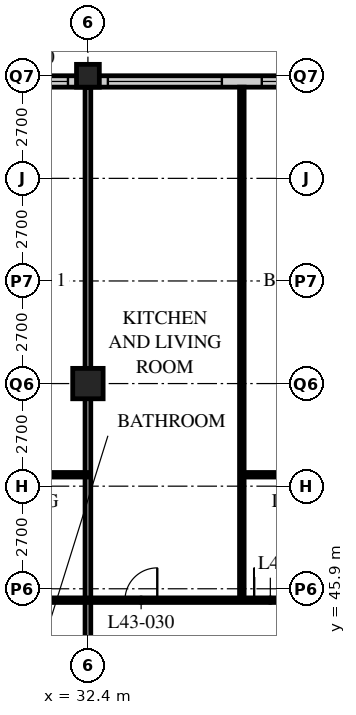
"""IFC4 building model, lengths in metres.
Left out: names, types, materials, properties, quantities, classifications, styles, units other than length and angle.
Written with IfcOpenShell. Run it as: python <this file> out.ifc"""

import sys

from ifc_helpers import new_model, si_unit, direction, frame, frame_2d, origin, origin_2d, place, context, subcontext, project, spatial, rectangle, hollow_rectangle, extrude, element, fill, save


model = new_model("IFC4")
c1 = context("Model", 3, precision=1e-05, world=origin(), true_north=direction((0.0, 1.0)))
c2 = subcontext(c1, "Body", "Model", "MODEL_VIEW")
j1 = project(units=[si_unit("LENGTHUNIT", "METRE"), si_unit("PLANEANGLEUNIT", "RADIAN")], contexts=[c1])
p1 = place(None, origin())
s1 = spatial("IfcSite", under=j1, at=p1, CompositionType="ELEMENT")
p2 = place(p1, origin())
s2 = spatial("IfcBuilding", under=s1, at=p2, CompositionType="ELEMENT")
p3 = place(p2, frame((0.0, 0.0, 170.4)))
s3 = spatial("IfcBuildingStorey", under=s2, at=p3, CompositionType="ELEMENT", Elevation=170.4)
p4 = place(p3, frame((32.4, 51.3, 0.0), z_axis=(0.0, 0.0, 1.0), x_axis=(1.0, 0.0, 0.0)))
e1 = element("IfcColumn", 1, at=p4, inside=s3, PredefinedType="COLUMN", context=c2, shape_type="SweptSolid", body=[
    extrude(hollow_rectangle(XDim=0.8, YDim=0.8, WallThickness=0.08, at=origin_2d()), origin(), (0.0, 0.0, 1.0), 3.6),
])
p5 = place(p3, frame((32.4, 59.4, 0.0), z_axis=(0.0, 0.0, 1.0), x_axis=(1.0, 0.0, 0.0)))
e2 = element("IfcColumn", 2, at=p5, inside=s3, PredefinedType="COLUMN", context=c2, shape_type="SweptSolid", body=[
    extrude(hollow_rectangle(XDim=0.6, YDim=0.6, WallThickness=0.05, at=origin_2d()), origin(), (0.0, 0.0, 1.0), 3.6),
])
p6 = place(p3, frame((48.3, 59.25, 0.0), z_axis=(0.0, 0.0, 1.0), x_axis=(-1.0, 0.0, 0.0)))
e3 = element("IfcWall", 3, at=p6, inside=s3, PredefinedType="SOLIDWALL", context=c2, shape_type="SweptSolid", body=[
    extrude(rectangle(XDim=40.2, YDim=0.3, at=frame_2d((20.1, 0.0))), origin(), (0.0, 0.0, 1.0), 3.39),
])
p7 = place(p6, frame((0.225, 0.0, 0.6)))
e4 = element("IfcOpeningElement", 4, at=p7, cuts=e3, PredefinedType="OPENING", context=c2, shape_type="SweptSolid", body=[
    extrude(rectangle(XDim=3.0, YDim=2.4, at=frame_2d((1.5, 1.2))), frame((0.0, 0.16, 0.0), z_axis=(0.0, -1.0, 0.0), x_axis=(1.0, 0.0, 0.0)), (0.0, 0.0, 1.0), 0.32),
])
p8 = place(p6, frame((4.275, 0.0, 0.6)))
e5 = element("IfcOpeningElement", 5, at=p8, cuts=e3, PredefinedType="OPENING", context=c2, shape_type="SweptSolid", body=[
    extrude(rectangle(XDim=3.0, YDim=2.4, at=frame_2d((1.5, 1.2))), frame((0.0, 0.16, 0.0), z_axis=(0.0, -1.0, 0.0), x_axis=(1.0, 0.0, 0.0)), (0.0, 0.0, 1.0), 0.32),
])
p9 = place(p6, frame((8.325, 0.0, 0.6)))
e6 = element("IfcOpeningElement", 6, at=p9, cuts=e3, PredefinedType="OPENING", context=c2, shape_type="SweptSolid", body=[
    extrude(rectangle(XDim=3.0, YDim=2.4, at=frame_2d((1.5, 1.2))), frame((0.0, 0.16, 0.0), z_axis=(0.0, -1.0, 0.0), x_axis=(1.0, 0.0, 0.0)), (0.0, 0.0, 1.0), 0.32),
])
p10 = place(p6, frame((12.375, 0.0, 0.6)))
e7 = element("IfcOpeningElement", 7, at=p10, cuts=e3, PredefinedType="OPENING", context=c2, shape_type="SweptSolid", body=[
    extrude(rectangle(XDim=3.0, YDim=2.4, at=frame_2d((1.5, 1.2))), frame((0.0, 0.16, 0.0), z_axis=(0.0, -1.0, 0.0), x_axis=(1.0, 0.0, 0.0)), (0.0, 0.0, 1.0), 0.32),
])
p11 = place(p6, frame((16.425, 0.0, 0.6)))
e8 = element("IfcOpeningElement", 8, at=p11, cuts=e3, PredefinedType="OPENING", context=c2, shape_type="SweptSolid", body=[
    extrude(rectangle(XDim=3.0, YDim=2.4, at=frame_2d((1.5, 1.2))), frame((0.0, 0.16, 0.0), z_axis=(0.0, -1.0, 0.0), x_axis=(1.0, 0.0, 0.0)), (0.0, 0.0, 1.0), 0.32),
])
p12 = place(p6, frame((20.475, 0.0, 0.6)))
e9 = element("IfcOpeningElement", 9, at=p12, cuts=e3, PredefinedType="OPENING", context=c2, shape_type="SweptSolid", body=[
    extrude(rectangle(XDim=3.0, YDim=2.4, at=frame_2d((1.5, 1.2))), frame((0.0, 0.16, 0.0), z_axis=(0.0, -1.0, 0.0), x_axis=(1.0, 0.0, 0.0)), (0.0, 0.0, 1.0), 0.32),
])
p13 = place(p6, frame((24.525, 0.0, 0.6)))
e10 = element("IfcOpeningElement", 10, at=p13, cuts=e3, PredefinedType="OPENING", context=c2, shape_type="SweptSolid", body=[
    extrude(rectangle(XDim=3.0, YDim=2.4, at=frame_2d((1.5, 1.2))), frame((0.0, 0.16, 0.0), z_axis=(0.0, -1.0, 0.0), x_axis=(1.0, 0.0, 0.0)), (0.0, 0.0, 1.0), 0.32),
])
p14 = place(p6, frame((28.575, 0.0, 0.6)))
e11 = element("IfcOpeningElement", 11, at=p14, cuts=e3, PredefinedType="OPENING", context=c2, shape_type="SweptSolid", body=[
    extrude(rectangle(XDim=3.0, YDim=2.4, at=frame_2d((1.5, 1.2))), frame((0.0, 0.16, 0.0), z_axis=(0.0, -1.0, 0.0), x_axis=(1.0, 0.0, 0.0)), (0.0, 0.0, 1.0), 0.32),
])
p15 = place(p6, frame((32.625, 0.0, 0.6)))
e12 = element("IfcOpeningElement", 12, at=p15, cuts=e3, PredefinedType="OPENING", context=c2, shape_type="SweptSolid", body=[
    extrude(rectangle(XDim=3.0, YDim=2.4, at=frame_2d((1.5, 1.2))), frame((0.0, 0.16, 0.0), z_axis=(0.0, -1.0, 0.0), x_axis=(1.0, 0.0, 0.0)), (0.0, 0.0, 1.0), 0.32),
])
p16 = place(p6, frame((36.675, 0.0, 0.6)))
e13 = element("IfcOpeningElement", 13, at=p16, cuts=e3, PredefinedType="OPENING", context=c2, shape_type="SweptSolid", body=[
    extrude(rectangle(XDim=3.0, YDim=2.4, at=frame_2d((1.5, 1.2))), frame((0.0, 0.16, 0.0), z_axis=(0.0, -1.0, 0.0), x_axis=(1.0, 0.0, 0.0)), (0.0, 0.0, 1.0), 0.32),
])
p17 = place(p3, frame((32.4, 43.2, 0.0), z_axis=(0.0, 0.0, 1.0), x_axis=(0.0, 1.0, 0.0)))
e14 = element("IfcWall", 14, at=p17, inside=s3, PredefinedType="PARTITIONING", context=c2, shape_type="SweptSolid", body=[
    extrude(rectangle(XDim=15.9, YDim=0.15, at=frame_2d((7.95, 0.0))), origin(), (0.0, 0.0, 1.0), 2.778),
])
p18 = place(p3, frame((36.45, 45.6, 0.0), z_axis=(0.0, 0.0, 1.0), x_axis=(0.0, 1.0, 0.0)))
e15 = element("IfcWall", 15, at=p18, inside=s3, PredefinedType="PARTITIONING", context=c2, shape_type="SweptSolid", body=[
    extrude(rectangle(XDim=13.5, YDim=0.12, at=frame_2d((6.75, 0.0))), origin(), (0.0, 0.0, 1.0), 3.39),
])
p19 = place(p3, frame((8.15, 45.6, 0.0), z_axis=(0.0, 0.0, 1.0), x_axis=(1.0, 0.0, 0.0)))
e16 = element("IfcWall", 16, at=p19, inside=s3, PredefinedType="PARTITIONING", context=c2, shape_type="SweptSolid", body=[
    extrude(rectangle(XDim=40.4, YDim=0.12, at=frame_2d((20.2, 0.0))), origin(), (0.0, 0.0, 1.0), 3.39),
])
p20 = place(p19, frame((9.025, 0.0, 0.0)))
e17 = element("IfcOpeningElement", 17, at=p20, cuts=e16, PredefinedType="OPENING", context=c2, shape_type="SweptSolid", body=[
    extrude(rectangle(XDim=0.85, YDim=2.1, at=frame_2d((0.425, 1.05))), frame((0.0, 0.07, 0.0), z_axis=(0.0, -1.0, 0.0), x_axis=(1.0, 0.0, 0.0)), (0.0, 0.0, 1.0), 0.14),
])
p21 = place(p19, frame((12.425, 0.0, 0.0)))
e18 = element("IfcOpeningElement", 18, at=p21, cuts=e16, PredefinedType="OPENING", context=c2, shape_type="SweptSolid", body=[
    extrude(rectangle(XDim=0.85, YDim=2.1, at=frame_2d((0.425, 1.05))), frame((0.0, 0.07, 0.0), z_axis=(0.0, -1.0, 0.0), x_axis=(1.0, 0.0, 0.0)), (0.0, 0.0, 1.0), 0.14),
])
p22 = place(p19, frame((17.125, 0.0, 0.0)))
e19 = element("IfcOpeningElement", 19, at=p22, cuts=e16, PredefinedType="OPENING", context=c2, shape_type="SweptSolid", body=[
    extrude(rectangle(XDim=0.85, YDim=2.1, at=frame_2d((0.425, 1.05))), frame((0.0, 0.07, 0.0), z_axis=(0.0, -1.0, 0.0), x_axis=(1.0, 0.0, 0.0)), (0.0, 0.0, 1.0), 0.14),
])
p23 = place(p19, frame((20.525, 0.0, 0.0)))
e20 = element("IfcOpeningElement", 20, at=p23, cuts=e16, PredefinedType="OPENING", context=c2, shape_type="SweptSolid", body=[
    extrude(rectangle(XDim=0.85, YDim=2.1, at=frame_2d((0.425, 1.05))), frame((0.0, 0.07, 0.0), z_axis=(0.0, -1.0, 0.0), x_axis=(1.0, 0.0, 0.0)), (0.0, 0.0, 1.0), 0.14),
])
p24 = place(p19, frame((25.225, 0.0, 0.0)))
e21 = element("IfcOpeningElement", 21, at=p24, cuts=e16, PredefinedType="OPENING", context=c2, shape_type="SweptSolid", body=[
    extrude(rectangle(XDim=0.85, YDim=2.1, at=frame_2d((0.425, 1.05))), frame((0.0, 0.07, 0.0), z_axis=(0.0, -1.0, 0.0), x_axis=(1.0, 0.0, 0.0)), (0.0, 0.0, 1.0), 0.14),
])
p25 = place(p19, frame((28.625, 0.0, 0.0)))
e22 = element("IfcOpeningElement", 22, at=p25, cuts=e16, PredefinedType="OPENING", context=c2, shape_type="SweptSolid", body=[
    extrude(rectangle(XDim=0.85, YDim=2.1, at=frame_2d((0.425, 1.05))), frame((0.0, 0.07, 0.0), z_axis=(0.0, -1.0, 0.0), x_axis=(1.0, 0.0, 0.0)), (0.0, 0.0, 1.0), 0.14),
])
p26 = place(p19, frame((32.825, 0.0, 0.0)))
e23 = element("IfcOpeningElement", 23, at=p26, cuts=e16, PredefinedType="OPENING", context=c2, shape_type="SweptSolid", body=[
    extrude(rectangle(XDim=0.85, YDim=2.1, at=frame_2d((0.425, 1.05))), frame((0.0, 0.07, 0.0), z_axis=(0.0, -1.0, 0.0), x_axis=(1.0, 0.0, 0.0)), (0.0, 0.0, 1.0), 0.14),
])
p27 = place(p19, frame((36.675, 0.0, 0.0)))
e24 = element("IfcOpeningElement", 24, at=p27, cuts=e16, PredefinedType="OPENING", context=c2, shape_type="SweptSolid", body=[
    extrude(rectangle(XDim=0.85, YDim=2.1, at=frame_2d((0.425, 1.05))), frame((0.0, 0.07, 0.0), z_axis=(0.0, -1.0, 0.0), x_axis=(1.0, 0.0, 0.0)), (0.0, 0.0, 1.0), 0.14),
])
p28 = place(p19, frame((6.725, 0.0, 0.0)))
e25 = element("IfcOpeningElement", 25, at=p28, cuts=e16, PredefinedType="OPENING", context=c2, shape_type="SweptSolid", body=[
    extrude(rectangle(XDim=0.85, YDim=2.1, at=frame_2d((0.425, 1.05))), frame((0.0, 0.07, 0.0), z_axis=(0.0, -1.0, 0.0), x_axis=(1.0, 0.0, 0.0)), (0.0, 0.0, 1.0), 0.14),
])
p29 = place(p19, frame((2.875, 0.0, 0.0)))
e26 = element("IfcOpeningElement", 26, at=p29, cuts=e16, PredefinedType="OPENING", context=c2, shape_type="SweptSolid", body=[
    extrude(rectangle(XDim=0.85, YDim=2.1, at=frame_2d((0.425, 1.05))), frame((0.0, 0.07, 0.0), z_axis=(0.0, -1.0, 0.0), x_axis=(1.0, 0.0, 0.0)), (0.0, 0.0, 1.0), 0.14),
])
p30 = place(p3, frame((28.35, 48.9, 0.0), z_axis=(0.0, 0.0, 1.0), x_axis=(1.0, 0.0, 0.0)))
e27 = element("IfcWall", 27, at=p30, inside=s3, PredefinedType="PARTITIONING", context=c2, shape_type="SweptSolid", body=[
    extrude(rectangle(XDim=4.05, YDim=0.12, at=frame_2d((2.025, 0.0))), origin(), (0.0, 0.0, 1.0), 3.39),
])
p31 = place(p30, frame((1.6, 0.0, 0.0)))
e28 = element("IfcOpeningElement", 28, at=p31, cuts=e27, PredefinedType="OPENING", context=c2, shape_type="SweptSolid", body=[
    extrude(rectangle(XDim=0.85, YDim=2.1, at=frame_2d((0.425, 1.05))), frame((0.0, 0.07, 0.0), z_axis=(0.0, -1.0, 0.0), x_axis=(1.0, 0.0, 0.0)), (0.0, 0.0, 1.0), 0.14),
])
p32 = place(p3, frame((36.45, 48.9, 0.0), z_axis=(0.0, 0.0, 1.0), x_axis=(1.0, 0.0, 0.0)))
e29 = element("IfcWall", 29, at=p32, inside=s3, PredefinedType="PARTITIONING", context=c2, shape_type="SweptSolid", body=[
    extrude(rectangle(XDim=8.1, YDim=0.12, at=frame_2d((4.05, 0.0))), origin(), (0.0, 0.0, 1.0), 3.39),
])
p33 = place(p32, frame((1.6, 0.0, 0.0)))
e30 = element("IfcOpeningElement", 30, at=p33, cuts=e29, PredefinedType="OPENING", context=c2, shape_type="SweptSolid", body=[
    extrude(rectangle(XDim=0.85, YDim=2.1, at=frame_2d((0.425, 1.05))), frame((0.0, 0.07, 0.0), z_axis=(0.0, -1.0, 0.0), x_axis=(1.0, 0.0, 0.0)), (0.0, 0.0, 1.0), 0.14),
])
p34 = place(p32, frame((5.65, 0.0, 0.0)))
e31 = element("IfcOpeningElement", 31, at=p34, cuts=e29, PredefinedType="OPENING", context=c2, shape_type="SweptSolid", body=[
    extrude(rectangle(XDim=0.85, YDim=2.1, at=frame_2d((0.425, 1.05))), frame((0.0, 0.07, 0.0), z_axis=(0.0, -1.0, 0.0), x_axis=(1.0, 0.0, 0.0)), (0.0, 0.0, 1.0), 0.14),
])
p35 = place(p9, origin())
e32 = element("IfcWindow", 32, at=p35, inside=s3, PartitioningType="SINGLE_PANEL", PredefinedType="WINDOW", context=c2, shape_type="SweptSolid", body=[
    extrude(rectangle(XDim=3.0, YDim=2.4, at=frame_2d((1.5, 1.2))), frame((0.0, 0.03, 0.0), z_axis=(0.0, -1.0, 0.0), x_axis=(1.0, 0.0, 0.0)), (0.0, 0.0, 1.0), 0.06),
])
fill(e6, e32)
p36 = place(p10, origin())
e33 = element("IfcWindow", 33, at=p36, inside=s3, PartitioningType="SINGLE_PANEL", PredefinedType="WINDOW", context=c2, shape_type="SweptSolid", body=[
    extrude(rectangle(XDim=3.0, YDim=2.4, at=frame_2d((1.5, 1.2))), frame((0.0, 0.03, 0.0), z_axis=(0.0, -1.0, 0.0), x_axis=(1.0, 0.0, 0.0)), (0.0, 0.0, 1.0), 0.06),
])
fill(e7, e33)
p37 = place(p11, origin())
e34 = element("IfcWindow", 34, at=p37, inside=s3, PartitioningType="SINGLE_PANEL", PredefinedType="WINDOW", context=c2, shape_type="SweptSolid", body=[
    extrude(rectangle(XDim=3.0, YDim=2.4, at=frame_2d((1.5, 1.2))), frame((0.0, 0.03, 0.0), z_axis=(0.0, -1.0, 0.0), x_axis=(1.0, 0.0, 0.0)), (0.0, 0.0, 1.0), 0.06),
])
fill(e8, e34)
p38 = place(p24, origin())
e35 = element("IfcDoor", 35, at=p38, inside=s3, OperationType="SINGLE_SWING_RIGHT", PredefinedType="DOOR", context=c2, shape_type="SweptSolid", body=[
    extrude(rectangle(XDim=0.85, YDim=2.1, at=frame_2d((0.425, 1.05))), frame((0.0, 0.025, 0.0), z_axis=(0.0, -1.0, 0.0), x_axis=(1.0, 0.0, 0.0)), (0.0, 0.0, 1.0), 0.05),
])
fill(e21, e35)
p39 = place(p25, origin())
e36 = element("IfcDoor", 36, at=p39, inside=s3, OperationType="SINGLE_SWING_LEFT", PredefinedType="DOOR", context=c2, shape_type="SweptSolid", body=[
    extrude(rectangle(XDim=0.85, YDim=2.1, at=frame_2d((0.425, 1.05))), frame((0.0, 0.025, 0.0), z_axis=(0.0, -1.0, 0.0), x_axis=(1.0, 0.0, 0.0)), (0.0, 0.0, 1.0), 0.05),
])
fill(e22, e36)
save(model, sys.argv[1])
